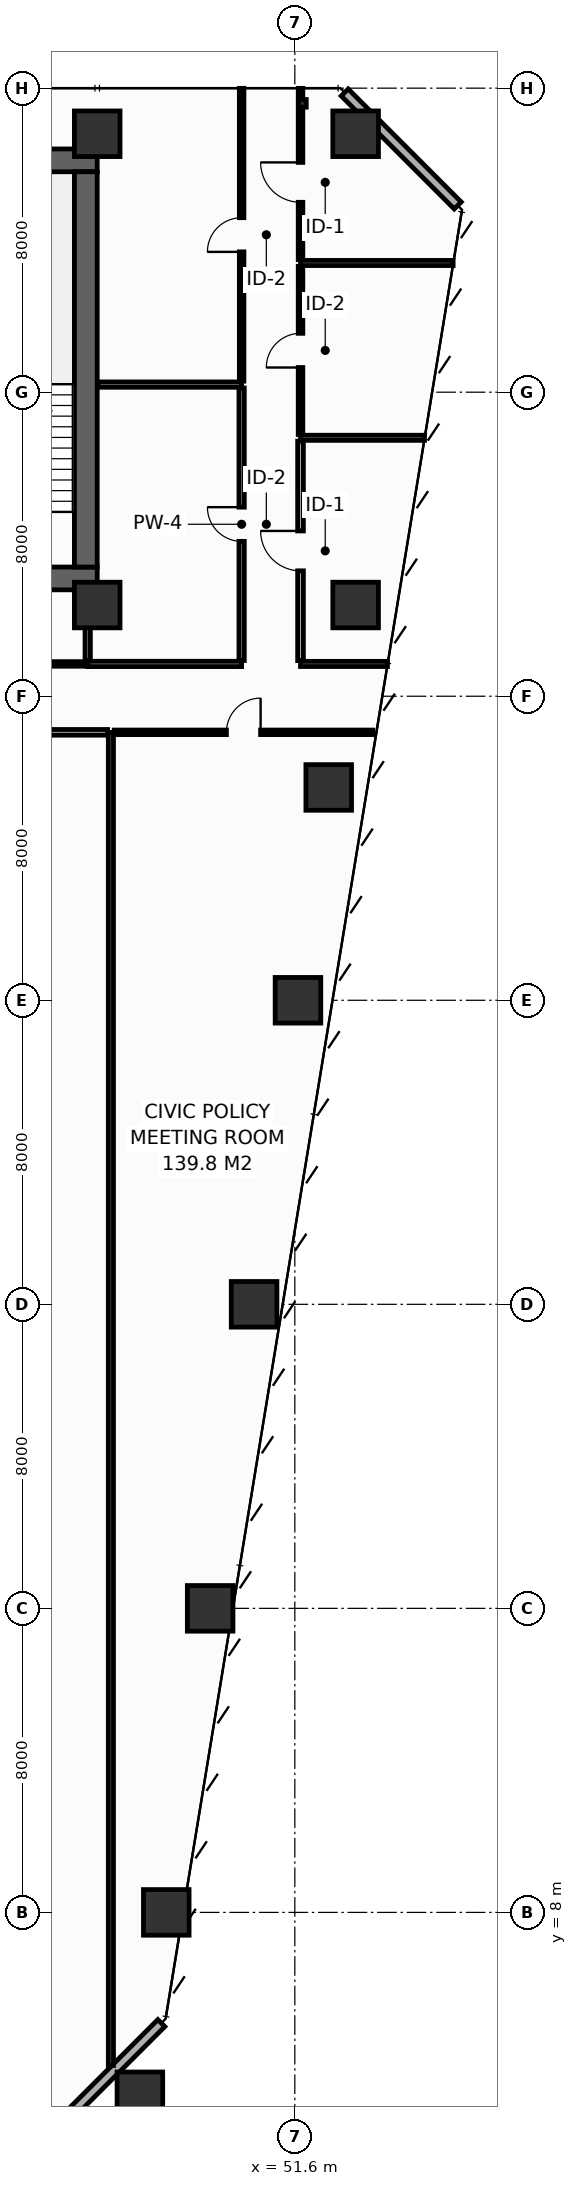
"""IFC4 building model, lengths in metres.
Left out: names, types, materials, properties, quantities, classifications, styles, units other than length and angle.
Written with IfcOpenShell. Run it as: python <this file> out.ifc"""

import sys

from ifc_helpers import new_model, si_unit, direction, frame, frame_2d, origin, origin_2d, place, context, subcontext, project, spatial, rectangle, hollow_rectangle, extrude, element, fill, save


model = new_model("IFC4")
c1 = context("Model", 3, precision=1e-05, world=origin(), true_north=direction((0.0, 1.0)))
c2 = subcontext(c1, "Body", "Model", "MODEL_VIEW")
j1 = project(units=[si_unit("LENGTHUNIT", "METRE"), si_unit("PLANEANGLEUNIT", "RADIAN")], contexts=[c1])
p1 = place(None, origin())
s1 = spatial("IfcSite", under=j1, at=p1, CompositionType="ELEMENT")
p2 = place(p1, origin())
s2 = spatial("IfcBuilding", under=s1, at=p2, CompositionType="ELEMENT")
p3 = place(p2, frame((0.0, 0.0, 73.6)))
s3 = spatial("IfcBuildingStorey", under=s2, at=p3, CompositionType="ELEMENT", Elevation=73.6)
p4 = place(p3, frame((13.5, 43.1, 0.0), z_axis=(0.0, 0.0, 1.0), x_axis=(1.0, 0.0, 0.0)))
e1 = element("IfcWall", 1, at=p4, inside=s3, PredefinedType="SHEAR", context=c2, shape_type="SweptSolid", body=[
    extrude(rectangle(XDim=32.9, YDim=0.6, at=frame_2d((16.45, 0.0))), origin(), (0.0, 0.0, 1.0), 4.15),
])
p5 = place(p4, frame((5.4, 0.0, 0.0)))
e2 = element("IfcOpeningElement", 2, at=p5, cuts=e1, PredefinedType="OPENING", context=c2, shape_type="SweptSolid", body=[
    extrude(rectangle(XDim=1.1, YDim=2.15, at=frame_2d((0.55, 1.075))), frame((0.0, 0.31, 0.0), z_axis=(0.0, -1.0, 0.0), x_axis=(1.0, 0.0, 0.0)), (0.0, 0.0, 1.0), 0.62),
])
p6 = place(p4, frame((25.6, 0.0, 0.0)))
e3 = element("IfcOpeningElement", 3, at=p6, cuts=e1, PredefinedType="OPENING", context=c2, shape_type="SweptSolid", body=[
    extrude(rectangle(XDim=1.1, YDim=2.15, at=frame_2d((0.55, 1.075))), frame((0.0, 0.31, 0.0), z_axis=(0.0, -1.0, 0.0), x_axis=(1.0, 0.0, 0.0)), (0.0, 0.0, 1.0), 0.62),
])
p7 = place(p3, frame((13.5, 54.1, 0.0), z_axis=(0.0, 0.0, 1.0), x_axis=(1.0, 0.0, 0.0)))
e4 = element("IfcWall", 4, at=p7, inside=s3, PredefinedType="SHEAR", context=c2, shape_type="SweptSolid", body=[
    extrude(rectangle(XDim=32.9, YDim=0.6, at=frame_2d((16.45, 0.0))), origin(), (0.0, 0.0, 1.0), 4.15),
])
p8 = place(p3, frame((46.1, 43.4, 0.0), z_axis=(0.0, 0.0, 1.0), x_axis=(0.0, 1.0, 0.0)))
e5 = element("IfcWall", 5, at=p8, inside=s3, PredefinedType="SHEAR", context=c2, shape_type="SweptSolid", body=[
    extrude(rectangle(XDim=10.4, YDim=0.6, at=frame_2d((5.2, 0.0))), origin(), (0.0, 0.0, 1.0), 4.15),
])
for number, where, z_axis, x_axis in (
    (6, (46.4, 54.8, 0.0), (0.0, 0.0, 1.0), (1.0, 0.0, 0.0)),
    (7, (53.2, 54.8, 0.0), (0.0, 0.0, 1.0), (1.0, 0.0, 0.0)),
    (8, (46.4, 42.4, 0.0), (0.0, 0.0, 1.0), (1.0, 0.0, 0.0)),
    (9, (53.2, 42.4, 0.0), (0.0, 0.0, 1.0), (1.0, 0.0, 0.0)),
    (10, (47.523, 3.2, 0.0), (0.0, 0.0, 1.0), (1.0, 0.0, 0.0)),
    (11, (48.217, 8.0, 0.0), (0.0, 0.0, 1.0), (1.0, 0.0, 0.0)),
    (12, (49.372, 16.0, 0.0), (0.0, 0.0, 1.0), (1.0, 0.0, 0.0)),
    (13, (50.528, 24.0, 0.0), (0.0, 0.0, 1.0), (1.0, 0.0, 0.0)),
    (14, (51.683, 32.0, 0.0), (0.0, 0.0, 1.0), (1.0, 0.0, 0.0)),
    (15, (52.492, 37.6, 0.0), (0.0, 0.0, 1.0), (1.0, 0.0, 0.0)),
):
    element("IfcColumn", number, at=place(p3, frame(where, z_axis=z_axis, x_axis=x_axis)), inside=s3, PredefinedType="COLUMN", context=c2, shape_type="SweptSolid", body=[
        extrude(hollow_rectangle(XDim=1.2, YDim=1.2, WallThickness=0.055, at=origin_2d()), origin(), (0.0, 0.0, 1.0), 4.4),
    ])
p9 = place(p3, frame((51.8, 55.6, 0.0), z_axis=(0.0, 0.0, 1.0), x_axis=(1.0, 0.0, 0.0)))
e16 = element("IfcColumn", 16, at=p9, inside=s3, PredefinedType="PILASTER", context=c2, shape_type="SweptSolid", body=[
    extrude(hollow_rectangle(XDim=0.2, YDim=0.2, WallThickness=0.01, at=origin_2d()), origin(), (0.0, 0.0, 1.0), 4.4),
])
for number, where, z_axis, x_axis in (
    (17, (45.113, 2.113, 0.0), (0.0, 0.0, 1.0), (0.707, 0.707, 0.0)),
    (18, (55.887, 52.913, 0.0), (0.0, 0.0, 1.0), (-0.707, 0.707, 0.0)),
):
    element("IfcWall", number, at=place(p3, frame(where, z_axis=z_axis, x_axis=x_axis)), inside=s3, PredefinedType="STANDARD", context=c2, shape_type="SweptSolid", body=[
        extrude(rectangle(XDim=4.206, YDim=0.26, at=frame_2d((2.103, 0.0))), origin(), (0.0, 0.0, 1.0), 4.15),
    ])
p10 = place(p3, frame((46.15, 40.85, 0.0), z_axis=(0.0, 0.0, 1.0), x_axis=(1.0, 0.0, 0.0)))
e19 = element("IfcWall", 19, at=p10, inside=s3, PredefinedType="PARTITIONING", context=c2, shape_type="SweptSolid", body=[
    extrude(rectangle(XDim=4.05, YDim=0.14, at=frame_2d((2.025, 0.0))), origin(), (0.0, 0.0, 1.0), 4.15),
])
p11 = place(p3, frame((46.15, 40.94, 0.0), z_axis=(0.0, 0.0, 1.0), x_axis=(0.0, 1.0, 0.0)))
e20 = element("IfcWall", 20, at=p11, inside=s3, PredefinedType="PARTITIONING", context=c2, shape_type="SweptSolid", body=[
    extrude(rectangle(XDim=1.84, YDim=0.14, at=frame_2d((0.92, 0.0))), origin(), (0.0, 0.0, 1.0), 4.15),
])
p12 = place(p3, frame((46.42, 48.2, 0.0), z_axis=(0.0, 0.0, 1.0), x_axis=(1.0, 0.0, 0.0)))
e21 = element("IfcWall", 21, at=p12, inside=s3, PredefinedType="PARTITIONING", context=c2, shape_type="SweptSolid", body=[
    extrude(rectangle(XDim=3.78, YDim=0.14, at=frame_2d((1.89, 0.0))), origin(), (0.0, 0.0, 1.0), 4.15),
])
p13 = place(p3, frame((50.2, 40.94, 0.0), z_axis=(0.0, 0.0, 1.0), x_axis=(0.0, 1.0, 0.0)))
e22 = element("IfcWall", 22, at=p13, inside=s3, PredefinedType="PARTITIONING", context=c2, shape_type="SweptSolid", body=[
    extrude(rectangle(XDim=7.17, YDim=0.14, at=frame_2d((3.585, 0.0))), origin(), (0.0, 0.0, 1.0), 3.335),
])
p14 = place(p13, frame((3.135, 0.0, 0.0)))
e23 = element("IfcOpeningElement", 23, at=p14, cuts=e22, PredefinedType="OPENING", context=c2, shape_type="SweptSolid", body=[
    extrude(rectangle(XDim=0.9, YDim=2.1, at=frame_2d((0.45, 1.05))), frame((0.0, 0.08, 0.0), z_axis=(0.0, -1.0, 0.0), x_axis=(1.0, 0.0, 0.0)), (0.0, 0.0, 1.0), 0.16),
])
p15 = place(p3, frame((50.2, 48.29, 0.0), z_axis=(0.0, 0.0, 1.0), x_axis=(0.0, 1.0, 0.0)))
e24 = element("IfcWall", 24, at=p15, inside=s3, PredefinedType="PARTITIONING", context=c2, shape_type="SweptSolid", body=[
    extrude(rectangle(XDim=7.705, YDim=0.12, at=frame_2d((3.853, 0.0))), origin(), (0.0, 0.0, 1.0), 3.435),
])
p16 = place(p15, frame((3.402, 0.0, 0.0)))
e25 = element("IfcOpeningElement", 25, at=p16, cuts=e24, PredefinedType="OPENING", context=c2, shape_type="SweptSolid", body=[
    extrude(rectangle(XDim=0.9, YDim=2.1, at=frame_2d((0.45, 1.05))), frame((0.0, 0.07, 0.0), z_axis=(0.0, -1.0, 0.0), x_axis=(1.0, 0.0, 0.0)), (0.0, 0.0, 1.0), 0.14),
])
p17 = place(p3, frame((51.75, 40.85, 0.0), z_axis=(0.0, 0.0, 1.0), x_axis=(1.0, 0.0, 0.0)))
e26 = element("IfcWall", 26, at=p17, inside=s3, PredefinedType="PARTITIONING", context=c2, shape_type="SweptSolid", body=[
    extrude(rectangle(XDim=2.287, YDim=0.135, at=frame_2d((1.143, 0.0))), origin(), (0.0, 0.0, 1.0), 3.635),
])
p18 = place(p3, frame((51.75, 46.8, 0.0), z_axis=(0.0, 0.0, 1.0), x_axis=(1.0, 0.0, 0.0)))
e27 = element("IfcWall", 27, at=p18, inside=s3, PredefinedType="PARTITIONING", context=c2, shape_type="SweptSolid", body=[
    extrude(rectangle(XDim=3.262, YDim=0.135, at=frame_2d((1.631, 0.0))), origin(), (0.0, 0.0, 1.0), 3.335),
])
p19 = place(p3, frame((51.75, 51.4, 0.0), z_axis=(0.0, 0.0, 1.0), x_axis=(1.0, 0.0, 0.0)))
e28 = element("IfcWall", 28, at=p19, inside=s3, PredefinedType="PARTITIONING", context=c2, shape_type="SweptSolid", body=[
    extrude(rectangle(XDim=4.015, YDim=0.135, at=frame_2d((2.008, 0.0))), origin(), (0.0, 0.0, 1.0), 3.335),
])
p20 = place(p3, frame((51.75, 40.938, 0.0), z_axis=(0.0, 0.0, 1.0), x_axis=(0.0, 1.0, 0.0)))
e29 = element("IfcWall", 29, at=p20, inside=s3, PredefinedType="PARTITIONING", context=c2, shape_type="SweptSolid", body=[
    extrude(rectangle(XDim=5.775, YDim=0.15, at=frame_2d((2.887, 0.0))), origin(), (0.0, 0.0, 1.0), 3.335),
])
p21 = place(p20, frame((2.362, 0.0, 0.0)))
e30 = element("IfcOpeningElement", 30, at=p21, cuts=e29, PredefinedType="OPENING", context=c2, shape_type="SweptSolid", body=[
    extrude(rectangle(XDim=1.05, YDim=2.15, at=frame_2d((0.525, 1.075))), frame((0.0, 0.085, 0.0), z_axis=(0.0, -1.0, 0.0), x_axis=(1.0, 0.0, 0.0)), (0.0, 0.0, 1.0), 0.17),
])
p22 = place(p3, frame((51.75, 46.887, 0.0), z_axis=(0.0, 0.0, 1.0), x_axis=(0.0, 1.0, 0.0)))
e31 = element("IfcWall", 31, at=p22, inside=s3, PredefinedType="PARTITIONING", context=c2, shape_type="SweptSolid", body=[
    extrude(rectangle(XDim=4.425, YDim=0.12, at=frame_2d((2.212, 0.0))), origin(), (0.0, 0.0, 1.0), 4.15),
])
p23 = place(p22, frame((1.762, 0.0, 0.0)))
e32 = element("IfcOpeningElement", 32, at=p23, cuts=e31, PredefinedType="OPENING", context=c2, shape_type="SweptSolid", body=[
    extrude(rectangle(XDim=0.9, YDim=2.1, at=frame_2d((0.45, 1.05))), frame((0.0, 0.07, 0.0), z_axis=(0.0, -1.0, 0.0), x_axis=(1.0, 0.0, 0.0)), (0.0, 0.0, 1.0), 0.14),
])
p24 = place(p3, frame((51.75, 51.488, 0.0), z_axis=(0.0, 0.0, 1.0), x_axis=(0.0, 1.0, 0.0)))
e33 = element("IfcWall", 33, at=p24, inside=s3, PredefinedType="PARTITIONING", context=c2, shape_type="SweptSolid", body=[
    extrude(rectangle(XDim=4.508, YDim=0.12, at=frame_2d((2.254, 0.0))), origin(), (0.0, 0.0, 1.0), 3.435),
])
p25 = place(p24, frame((1.509, 0.0, 0.0)))
e34 = element("IfcOpeningElement", 34, at=p25, cuts=e33, PredefinedType="OPENING", context=c2, shape_type="SweptSolid", body=[
    extrude(rectangle(XDim=1.05, YDim=2.15, at=frame_2d((0.525, 1.075))), frame((0.0, 0.07, 0.0), z_axis=(0.0, -1.0, 0.0), x_axis=(1.0, 0.0, 0.0)), (0.0, 0.0, 1.0), 0.14),
])
p26 = place(p3, frame((40.995, 40.85, 0.0), z_axis=(0.0, 0.0, 1.0), x_axis=(1.0, 0.0, 0.0)))
e35 = element("IfcWall", 35, at=p26, inside=s3, PredefinedType="PARTITIONING", context=c2, shape_type="SweptSolid", body=[
    extrude(rectangle(XDim=5.155, YDim=0.12, at=frame_2d((2.577, 0.0))), origin(), (0.0, 0.0, 1.0), 4.15),
])
p27 = place(p26, frame((2.128, 0.0, 0.0)))
e36 = element("IfcOpeningElement", 36, at=p27, cuts=e35, PredefinedType="OPENING", context=c2, shape_type="SweptSolid", body=[
    extrude(rectangle(XDim=0.9, YDim=2.1, at=frame_2d((0.45, 1.05))), frame((0.0, 0.07, 0.0), z_axis=(0.0, -1.0, 0.0), x_axis=(1.0, 0.0, 0.0)), (0.0, 0.0, 1.0), 0.14),
])
p28 = place(p3, frame((46.76, 3.972, 0.0), z_axis=(0.0, 0.0, 1.0), x_axis=(0.0, 1.0, 0.0)))
e37 = element("IfcWall", 37, at=p28, inside=s3, PredefinedType="PARTITIONING", context=c2, shape_type="SweptSolid", body=[
    extrude(rectangle(XDim=35.078, YDim=0.135, at=frame_2d((17.539, 0.0))), origin(), (0.0, 0.0, 1.0), 3.335),
])
p29 = place(p3, frame((41.107, 39.05, 0.0), z_axis=(0.0, 0.0, 1.0), x_axis=(1.0, 0.0, 0.0)))
e38 = element("IfcWall", 38, at=p29, inside=s3, PredefinedType="PARTITIONING", context=c2, shape_type="SweptSolid", body=[
    extrude(rectangle(XDim=5.565, YDim=0.15, at=frame_2d((2.783, 0.0))), origin(), (0.0, 0.0, 1.0), 4.15),
])
p30 = place(p29, frame((2.257, 0.0, 0.0)))
e39 = element("IfcOpeningElement", 39, at=p30, cuts=e38, PredefinedType="OPENING", context=c2, shape_type="SweptSolid", body=[
    extrude(rectangle(XDim=1.05, YDim=2.15, at=frame_2d((0.525, 1.075))), frame((0.0, 0.085, 0.0), z_axis=(0.0, -1.0, 0.0), x_axis=(1.0, 0.0, 0.0)), (0.0, 0.0, 1.0), 0.17),
])
p31 = place(p3, frame((46.847, 39.05, 0.0), z_axis=(0.0, 0.0, 1.0), x_axis=(1.0, 0.0, 0.0)))
e40 = element("IfcWall", 40, at=p31, inside=s3, PredefinedType="PARTITIONING", context=c2, shape_type="SweptSolid", body=[
    extrude(rectangle(XDim=6.804, YDim=0.12, at=frame_2d((3.402, 0.0))), origin(), (0.0, 0.0, 1.0), 3.635),
])
p32 = place(p31, frame((2.952, 0.0, 0.0)))
e41 = element("IfcOpeningElement", 41, at=p32, cuts=e40, PredefinedType="OPENING", context=c2, shape_type="SweptSolid", body=[
    extrude(rectangle(XDim=0.9, YDim=2.1, at=frame_2d((0.45, 1.05))), frame((0.0, 0.07, 0.0), z_axis=(0.0, -1.0, 0.0), x_axis=(1.0, 0.0, 0.0)), (0.0, 0.0, 1.0), 0.14),
])
p33 = place(p14, origin())
e42 = element("IfcDoor", 42, at=p33, inside=s3, OperationType="SINGLE_SWING_RIGHT", PredefinedType="DOOR", context=c2, shape_type="SweptSolid", body=[
    extrude(rectangle(XDim=0.9, YDim=2.1, at=frame_2d((0.45, 1.05))), frame((0.0, 0.025, 0.0), z_axis=(0.0, -1.0, 0.0), x_axis=(1.0, 0.0, 0.0)), (0.0, 0.0, 1.0), 0.05),
])
fill(e23, e42)
p34 = place(p16, origin())
e43 = element("IfcDoor", 43, at=p34, inside=s3, OperationType="SINGLE_SWING_LEFT", PredefinedType="DOOR", context=c2, shape_type="SweptSolid", body=[
    extrude(rectangle(XDim=0.9, YDim=2.1, at=frame_2d((0.45, 1.05))), frame((0.0, 0.025, 0.0), z_axis=(0.0, -1.0, 0.0), x_axis=(1.0, 0.0, 0.0)), (0.0, 0.0, 1.0), 0.05),
])
fill(e25, e43)
p35 = place(p21, origin())
e44 = element("IfcDoor", 44, at=p35, inside=s3, OperationType="SINGLE_SWING_RIGHT", PredefinedType="DOOR", context=c2, shape_type="SweptSolid", body=[
    extrude(rectangle(XDim=1.05, YDim=2.15, at=frame_2d((0.525, 1.075))), frame((0.0, 0.025, 0.0), z_axis=(0.0, -1.0, 0.0), x_axis=(1.0, 0.0, 0.0)), (0.0, 0.0, 1.0), 0.05),
])
fill(e30, e44)
p36 = place(p23, origin())
e45 = element("IfcDoor", 45, at=p36, inside=s3, OperationType="SINGLE_SWING_LEFT", PredefinedType="DOOR", context=c2, shape_type="SweptSolid", body=[
    extrude(rectangle(XDim=0.9, YDim=2.1, at=frame_2d((0.45, 1.05))), frame((0.0, 0.025, 0.0), z_axis=(0.0, -1.0, 0.0), x_axis=(1.0, 0.0, 0.0)), (0.0, 0.0, 1.0), 0.05),
])
fill(e32, e45)
p37 = place(p25, origin())
e46 = element("IfcDoor", 46, at=p37, inside=s3, OperationType="SINGLE_SWING_RIGHT", PredefinedType="DOOR", context=c2, shape_type="SweptSolid", body=[
    extrude(rectangle(XDim=1.05, YDim=2.15, at=frame_2d((0.525, 1.075))), frame((0.0, 0.025, 0.0), z_axis=(0.0, -1.0, 0.0), x_axis=(1.0, 0.0, 0.0)), (0.0, 0.0, 1.0), 0.05),
])
fill(e34, e46)
p38 = place(p32, origin())
e47 = element("IfcDoor", 47, at=p38, inside=s3, OperationType="SINGLE_SWING_RIGHT", PredefinedType="DOOR", context=c2, shape_type="SweptSolid", body=[
    extrude(rectangle(XDim=0.9, YDim=2.1, at=frame_2d((0.45, 1.05))), frame((0.0, 0.025, 0.0), z_axis=(0.0, -1.0, 0.0), x_axis=(1.0, 0.0, 0.0)), (0.0, 0.0, 1.0), 0.05),
])
fill(e41, e47)
save(model, sys.argv[1])
